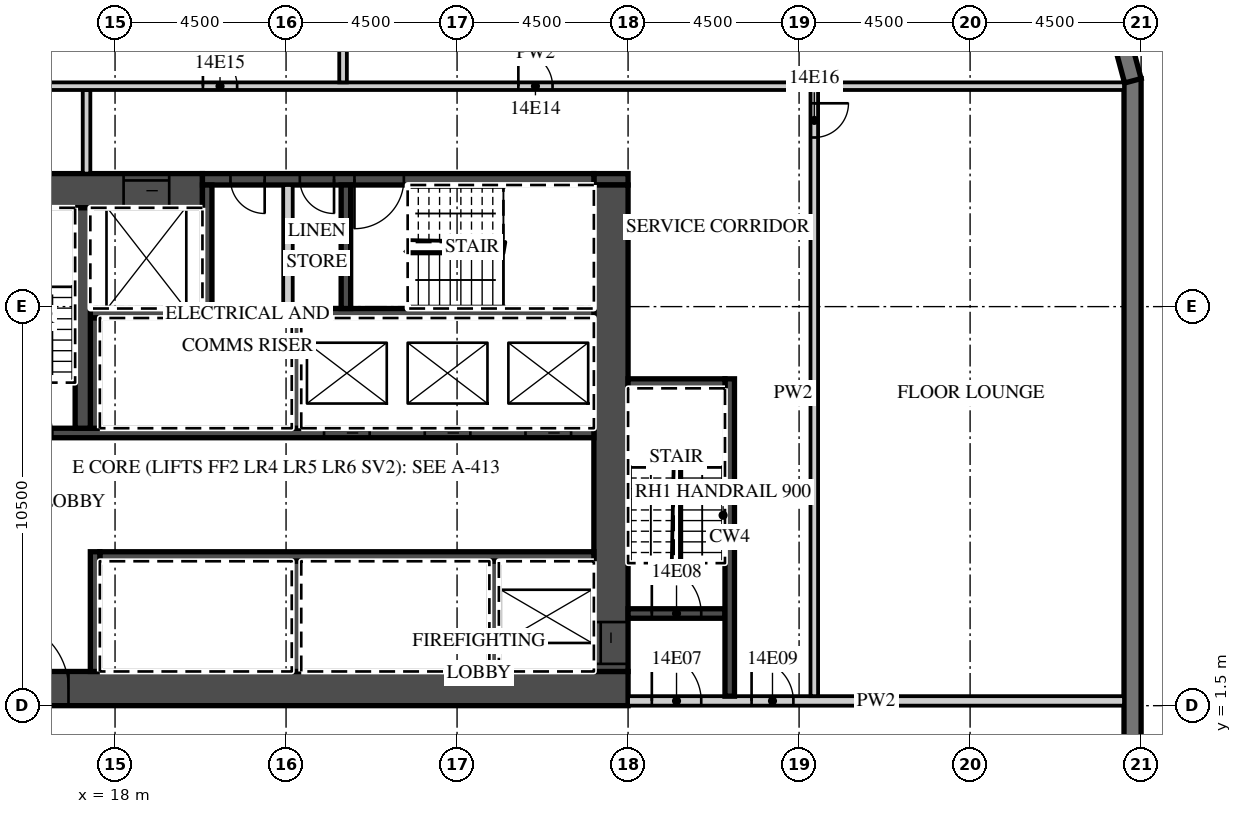
"""IFC4 building model, lengths in metres.
Left out: names, types, materials, properties, quantities, classifications, styles, units other than length and angle.
Written with IfcOpenShell. Run it as: python <this file> out.ifc"""

import sys

from ifc_helpers import new_model, si_unit, direction, frame, frame_2d, origin, place, context, subcontext, project, spatial, polyline, rectangle, outline, extrude, element, fill, save


model = new_model("IFC4")
c1 = context("Model", 3, precision=1e-05, world=origin(), true_north=direction((0.0, 1.0)))
c2 = subcontext(c1, "Body", "Model", "MODEL_VIEW")
j1 = project(units=[si_unit("LENGTHUNIT", "METRE"), si_unit("PLANEANGLEUNIT", "RADIAN")], contexts=[c1])
p1 = place(None, origin())
s1 = spatial("IfcSite", under=j1, at=p1, CompositionType="ELEMENT")
p2 = place(p1, origin())
s2 = spatial("IfcBuilding", under=s1, at=p2, CompositionType="ELEMENT")
p3 = place(p2, frame((0.0, 0.0, 76.5)))
s3 = spatial("IfcBuildingStorey", under=s2, at=p3, CompositionType="ELEMENT", Elevation=76.5)
p4 = place(p3, frame((44.775, -18.0, 0.0), z_axis=(0.0, 0.0, 1.0), x_axis=(0.0, 1.0, 0.0)))
e1 = element("IfcWall", 1, at=p4, inside=s3, PredefinedType="SOLIDWALL", context=c2, shape_type="SweptSolid", body=[
    extrude(rectangle(XDim=36.0, YDim=0.45, at=frame_2d((18.0, 0.0))), origin(), (0.0, 0.0, 1.0), 3.02),
])
p5 = place(p4, frame((3.9, 0.0, 0.45)))
e2 = element("IfcOpeningElement", 2, at=p5, cuts=e1, PredefinedType="OPENING", context=c2, shape_type="SweptSolid", body=[
    extrude(rectangle(XDim=3.3, YDim=2.25, at=frame_2d((1.65, 1.125))), frame((0.0, 0.235, 0.0), z_axis=(0.0, -1.0, 0.0), x_axis=(1.0, 0.0, 0.0)), (0.0, 0.0, 1.0), 0.47),
])
p6 = place(p4, frame((8.4, 0.0, 0.45)))
e3 = element("IfcOpeningElement", 3, at=p6, cuts=e1, PredefinedType="OPENING", context=c2, shape_type="SweptSolid", body=[
    extrude(rectangle(XDim=3.3, YDim=2.25, at=frame_2d((1.65, 1.125))), frame((0.0, 0.235, 0.0), z_axis=(0.0, -1.0, 0.0), x_axis=(1.0, 0.0, 0.0)), (0.0, 0.0, 1.0), 0.47),
])
p7 = place(p4, frame((12.9, 0.0, 0.45)))
e4 = element("IfcOpeningElement", 4, at=p7, cuts=e1, PredefinedType="OPENING", context=c2, shape_type="SweptSolid", body=[
    extrude(rectangle(XDim=3.3, YDim=2.25, at=frame_2d((1.65, 1.125))), frame((0.0, 0.235, 0.0), z_axis=(0.0, -1.0, 0.0), x_axis=(1.0, 0.0, 0.0)), (0.0, 0.0, 1.0), 0.47),
])
p8 = place(p3, frame((44.783, 17.942, 0.0), z_axis=(0.0, 0.0, 1.0), x_axis=(-0.25881466832, 0.965926999034, 0.0)))
e5 = element("IfcWall", 5, at=p8, inside=s3, PredefinedType="SOLIDWALL", context=c2, shape_type="SweptSolid", body=[
    extrude(outline(polyline([(0.0, -0.225), (2.071, -0.225), (1.95, 0.225), (0.121, 0.225), (0.0, -0.225)])), origin(), (0.0, 0.0, 1.0), 3.02),
])
p9 = place(p3, frame((13.5, 1.95, 0.0), z_axis=(0.0, 0.0, 1.0), x_axis=(1.0, 0.0, 0.0)))
e6 = element("IfcWall", 6, at=p9, inside=s3, PredefinedType="SHEAR", context=c2, shape_type="SweptSolid", body=[
    extrude(rectangle(XDim=18.0, YDim=0.9, at=frame_2d((9.0, 0.0))), origin(), (0.0, 0.0, 1.0), 3.02),
])
p10 = place(p9, frame((1.475, 0.0, 0.0)))
e7 = element("IfcOpeningElement", 7, at=p10, cuts=e6, PredefinedType="OPENING", context=c2, shape_type="SweptSolid", body=[
    extrude(rectangle(XDim=1.8, YDim=2.1, at=frame_2d((0.9, 1.05))), frame((0.0, 0.46, 0.0), z_axis=(0.0, -1.0, 0.0), x_axis=(1.0, 0.0, 0.0)), (0.0, 0.0, 1.0), 0.92),
])
p11 = place(p3, frame((13.5, 15.05, 0.0), z_axis=(0.0, 0.0, 1.0), x_axis=(1.0, 0.0, 0.0)))
e8 = element("IfcWall", 8, at=p11, inside=s3, PredefinedType="SHEAR", context=c2, shape_type="SweptSolid", body=[
    extrude(rectangle(XDim=6.8, YDim=0.9, at=frame_2d((3.4, 0.0))), origin(), (0.0, 0.0, 1.0), 3.02),
])
p12 = place(p11, frame((4.725, 0.0, 0.0)))
e9 = element("IfcOpeningElement", 9, at=p12, cuts=e8, PredefinedType="OPENING", context=c2, shape_type="SweptSolid", body=[
    extrude(rectangle(XDim=1.2, YDim=2.1, at=frame_2d((0.6, 1.05))), frame((0.0, 0.46, 0.0), z_axis=(0.0, -1.0, 0.0), x_axis=(1.0, 0.0, 0.0)), (0.0, 0.0, 1.0), 0.92),
])
p13 = place(p3, frame((30.6, 15.35, 0.0), z_axis=(0.0, 0.0, 1.0), x_axis=(1.0, 0.0, 0.0)))
e10 = element("IfcWall", 10, at=p13, inside=s3, PredefinedType="SHEAR", context=c2, shape_type="SweptSolid", body=[
    extrude(rectangle(XDim=0.9, YDim=0.3, at=frame_2d((0.45, 0.0))), origin(), (0.0, 0.0, 1.0), 3.02),
])
p14 = place(p3, frame((20.3, 15.35, 0.0), z_axis=(0.0, 0.0, 1.0), x_axis=(1.0, 0.0, 0.0)))
e11 = element("IfcWall", 11, at=p14, inside=s3, PredefinedType="SHEAR", context=c2, shape_type="SweptSolid", body=[
    extrude(rectangle(XDim=10.3, YDim=0.3, at=frame_2d((5.15, 0.0))), origin(), (0.0, 0.0, 1.0), 3.02),
])
p15 = place(p14, frame((4.0, 0.0, 0.0)))
e12 = element("IfcOpeningElement", 12, at=p15, cuts=e11, PredefinedType="OPENING", context=c2, shape_type="SweptSolid", body=[
    extrude(rectangle(XDim=1.3, YDim=2.1, at=frame_2d((0.65, 1.05))), frame((0.0, 0.16, 0.0), z_axis=(0.0, -1.0, 0.0), x_axis=(1.0, 0.0, 0.0)), (0.0, 0.0, 1.0), 0.32),
])
p16 = place(p14, frame((2.562, 0.0, 0.0)))
e13 = element("IfcOpeningElement", 13, at=p16, cuts=e11, PredefinedType="OPENING", context=c2, shape_type="SweptSolid", body=[
    extrude(rectangle(XDim=0.9, YDim=2.1, at=frame_2d((0.45, 1.05))), frame((0.0, 0.16, 0.0), z_axis=(0.0, -1.0, 0.0), x_axis=(1.0, 0.0, 0.0)), (0.0, 0.0, 1.0), 0.32),
])
p17 = place(p14, frame((0.738, 0.0, 0.0)))
e14 = element("IfcOpeningElement", 14, at=p17, cuts=e11, PredefinedType="OPENING", context=c2, shape_type="SweptSolid", body=[
    extrude(rectangle(XDim=0.9, YDim=2.1, at=frame_2d((0.45, 1.05))), frame((0.0, 0.16, 0.0), z_axis=(0.0, -1.0, 0.0), x_axis=(1.0, 0.0, 0.0)), (0.0, 0.0, 1.0), 0.32),
])
p18 = place(p3, frame((31.05, 2.4, 0.0), z_axis=(0.0, 0.0, 1.0), x_axis=(0.0, 1.0, 0.0)))
e15 = element("IfcWall", 15, at=p18, inside=s3, PredefinedType="SHEAR", context=c2, shape_type="SweptSolid", body=[
    extrude(rectangle(XDim=12.8, YDim=0.9, at=frame_2d((6.4, 0.0))), origin(), (0.0, 0.0, 1.0), 3.02),
])
p19 = place(p18, frame((0.2, 0.0, 0.0)))
e16 = element("IfcOpeningElement", 16, at=p19, cuts=e15, PredefinedType="OPENING", context=c2, shape_type="SweptSolid", body=[
    extrude(rectangle(XDim=1.1, YDim=2.1, at=frame_2d((0.55, 1.05))), frame((0.0, 0.46, 0.0), z_axis=(0.0, -1.0, 0.0), x_axis=(1.0, 0.0, 0.0)), (0.0, 0.0, 1.0), 0.92),
])
p20 = place(p3, frame((17.6, 5.425, 0.0), z_axis=(0.0, 0.0, 1.0), x_axis=(1.0, 0.0, 0.0)))
e17 = element("IfcWall", 17, at=p20, inside=s3, PredefinedType="SHEAR", context=c2, shape_type="SweptSolid", body=[
    extrude(rectangle(XDim=13.0, YDim=0.25, at=frame_2d((6.5, 0.0))), origin(), (0.0, 0.0, 1.0), 3.02),
])
p21 = place(p3, frame((17.475, 2.4, 0.0), z_axis=(0.0, 0.0, 1.0), x_axis=(0.0, 1.0, 0.0)))
e18 = element("IfcWall", 18, at=p21, inside=s3, PredefinedType="SHEAR", context=c2, shape_type="SweptSolid", body=[
    extrude(rectangle(XDim=3.15, YDim=0.25, at=frame_2d((1.575, 0.0))), origin(), (0.0, 0.0, 1.0), 3.02),
])
for number, where, z_axis, x_axis in (
    (19, (27.975, 2.4, 0.0), (0.0, 0.0, 1.0), (0.0, 1.0, 0.0)),
    (20, (22.775, 2.4, 0.0), (0.0, 0.0, 1.0), (0.0, 1.0, 0.0)),
):
    element("IfcWall", number, at=place(p3, frame(where, z_axis=z_axis, x_axis=x_axis)), inside=s3, PredefinedType="SHEAR", context=c2, shape_type="SweptSolid", body=[
        extrude(rectangle(XDim=2.9, YDim=0.25, at=frame_2d((1.45, 0.0))), origin(), (0.0, 0.0, 1.0), 3.02),
    ])
p22 = place(p3, frame((14.4, 8.675, 0.0), z_axis=(0.0, 0.0, 1.0), x_axis=(1.0, 0.0, 0.0)))
e21 = element("IfcWall", 21, at=p22, inside=s3, PredefinedType="SHEAR", context=c2, shape_type="SweptSolid", body=[
    extrude(rectangle(XDim=16.2, YDim=0.25, at=frame_2d((8.1, 0.0))), origin(), (0.0, 0.0, 1.0), 3.02),
])
p23 = place(p22, frame((14.4, 0.0, 0.0)))
e22 = element("IfcOpeningElement", 22, at=p23, cuts=e21, PredefinedType="OPENING", context=c2, shape_type="SweptSolid", body=[
    extrude(rectangle(XDim=1.2, YDim=2.1, at=frame_2d((0.6, 1.05))), frame((0.0, 0.135, 0.0), z_axis=(0.0, -1.0, 0.0), x_axis=(1.0, 0.0, 0.0)), (0.0, 0.0, 1.0), 0.27),
])
p24 = place(p22, frame((11.75, 0.0, 0.0)))
e23 = element("IfcOpeningElement", 23, at=p24, cuts=e21, PredefinedType="OPENING", context=c2, shape_type="SweptSolid", body=[
    extrude(rectangle(XDim=1.2, YDim=2.1, at=frame_2d((0.6, 1.05))), frame((0.0, 0.135, 0.0), z_axis=(0.0, -1.0, 0.0), x_axis=(1.0, 0.0, 0.0)), (0.0, 0.0, 1.0), 0.27),
])
p25 = place(p22, frame((9.1, 0.0, 0.0)))
e24 = element("IfcOpeningElement", 24, at=p25, cuts=e21, PredefinedType="OPENING", context=c2, shape_type="SweptSolid", body=[
    extrude(rectangle(XDim=1.2, YDim=2.1, at=frame_2d((0.6, 1.05))), frame((0.0, 0.135, 0.0), z_axis=(0.0, -1.0, 0.0), x_axis=(1.0, 0.0, 0.0)), (0.0, 0.0, 1.0), 0.27),
])
p26 = place(p22, frame((0.65, 0.0, 0.0)))
e25 = element("IfcOpeningElement", 25, at=p26, cuts=e21, PredefinedType="OPENING", context=c2, shape_type="SweptSolid", body=[
    extrude(rectangle(XDim=1.3, YDim=2.1, at=frame_2d((0.65, 1.05))), frame((0.0, 0.135, 0.0), z_axis=(0.0, -1.0, 0.0), x_axis=(1.0, 0.0, 0.0)), (0.0, 0.0, 1.0), 0.27),
])
p27 = place(p3, frame((17.35, 11.825, 0.0), z_axis=(0.0, 0.0, 1.0), x_axis=(1.0, 0.0, 0.0)))
e26 = element("IfcWall", 26, at=p27, inside=s3, PredefinedType="SHEAR", context=c2, shape_type="SweptSolid", body=[
    extrude(rectangle(XDim=13.25, YDim=0.25, at=frame_2d((6.625, 0.0))), origin(), (0.0, 0.0, 1.0), 3.02),
])
for number, where, z_axis, x_axis in (
    (27, (17.475, 8.8, 0.0), (0.0, 0.0, 1.0), (0.0, 1.0, 0.0)),
    (28, (22.775, 8.8, 0.0), (0.0, 0.0, 1.0), (0.0, 1.0, 0.0)),
):
    element("IfcWall", number, at=place(p3, frame(where, z_axis=z_axis, x_axis=x_axis)), inside=s3, PredefinedType="SHEAR", context=c2, shape_type="SweptSolid", body=[
        extrude(rectangle(XDim=2.9, YDim=0.25, at=frame_2d((1.45, 0.0))), origin(), (0.0, 0.0, 1.0), 3.02),
    ])
p28 = place(p3, frame((17.15, 8.8, 0.0), z_axis=(0.0, 0.0, 1.0), x_axis=(0.0, 1.0, 0.0)))
e29 = element("IfcWall", 29, at=p28, inside=s3, PredefinedType="SHEAR", context=c2, shape_type="SweptSolid", body=[
    extrude(rectangle(XDim=5.8, YDim=0.4, at=frame_2d((2.9, 0.0))), origin(), (0.0, 0.0, 1.0), 3.02),
])
for number, where, z_axis, x_axis in (
    (30, (20.425, 11.95, 0.0), (0.0, 0.0, 1.0), (0.0, 1.0, 0.0)),
    (31, (24.075, 11.95, 0.0), (0.0, 0.0, 1.0), (0.0, 1.0, 0.0)),
):
    element("IfcWall", number, at=place(p3, frame(where, z_axis=z_axis, x_axis=x_axis)), inside=s3, PredefinedType="SHEAR", context=c2, shape_type="SweptSolid", body=[
        extrude(rectangle(XDim=3.25, YDim=0.25, at=frame_2d((1.625, 0.0))), origin(), (0.0, 0.0, 1.0), 3.02),
    ])
p29 = place(p3, frame((22.55, 11.95, 0.0), z_axis=(0.0, 0.0, 1.0), x_axis=(0.0, 1.0, 0.0)))
e32 = element("IfcWall", 32, at=p29, inside=s3, PredefinedType="PARTITIONING", context=c2, shape_type="SweptSolid", body=[
    extrude(rectangle(XDim=3.25, YDim=0.25, at=frame_2d((1.625, 0.0))), origin(), (0.0, 0.0, 1.0), 3.02),
])
p30 = place(p3, frame((31.5, 1.625, 0.0), z_axis=(0.0, 0.0, 1.0), x_axis=(1.0, 0.0, 0.0)))
e33 = element("IfcWall", 33, at=p30, inside=s3, PredefinedType="PARTITIONING", context=c2, shape_type="SweptSolid", body=[
    extrude(rectangle(XDim=13.05, YDim=0.25, at=frame_2d((6.525, 0.0))), origin(), (0.0, 0.0, 1.0), 3.02),
])
p31 = place(p30, frame((0.625, 0.0, 0.0)))
e34 = element("IfcOpeningElement", 34, at=p31, cuts=e33, PredefinedType="OPENING", context=c2, shape_type="SweptSolid", body=[
    extrude(rectangle(XDim=1.3, YDim=2.1, at=frame_2d((0.65, 1.05))), frame((0.0, 0.135, 0.0), z_axis=(0.0, -1.0, 0.0), x_axis=(1.0, 0.0, 0.0)), (0.0, 0.0, 1.0), 0.27),
])
p32 = place(p30, frame((3.25, 0.0, 0.0)))
e35 = element("IfcOpeningElement", 35, at=p32, cuts=e33, PredefinedType="OPENING", context=c2, shape_type="SweptSolid", body=[
    extrude(rectangle(XDim=1.1, YDim=2.1, at=frame_2d((0.55, 1.05))), frame((0.0, 0.135, 0.0), z_axis=(0.0, -1.0, 0.0), x_axis=(1.0, 0.0, 0.0)), (0.0, 0.0, 1.0), 0.27),
])
p33 = place(p3, frame((31.5, 3.925, 0.0), z_axis=(0.0, 0.0, 1.0), x_axis=(1.0, 0.0, 0.0)))
e36 = element("IfcWall", 36, at=p33, inside=s3, PredefinedType="SHEAR", context=c2, shape_type="SweptSolid", body=[
    extrude(rectangle(XDim=2.55, YDim=0.25, at=frame_2d((1.275, 0.0))), origin(), (0.0, 0.0, 1.0), 3.02),
])
p34 = place(p33, frame((0.625, 0.0, 0.0)))
e37 = element("IfcOpeningElement", 37, at=p34, cuts=e36, PredefinedType="OPENING", context=c2, shape_type="SweptSolid", body=[
    extrude(rectangle(XDim=1.3, YDim=2.1, at=frame_2d((0.65, 1.05))), frame((0.0, 0.135, 0.0), z_axis=(0.0, -1.0, 0.0), x_axis=(1.0, 0.0, 0.0)), (0.0, 0.0, 1.0), 0.27),
])
p35 = place(p3, frame((34.175, 1.75, 0.0), z_axis=(0.0, 0.0, 1.0), x_axis=(0.0, 1.0, 0.0)))
e38 = element("IfcWall", 38, at=p35, inside=s3, PredefinedType="SHEAR", context=c2, shape_type="SweptSolid", body=[
    extrude(rectangle(XDim=8.35, YDim=0.25, at=frame_2d((4.175, 0.0))), origin(), (0.0, 0.0, 1.0), 3.02),
])
p36 = place(p3, frame((31.5, 9.975, 0.0), z_axis=(0.0, 0.0, 1.0), x_axis=(1.0, 0.0, 0.0)))
e39 = element("IfcWall", 39, at=p36, inside=s3, PredefinedType="SHEAR", context=c2, shape_type="SweptSolid", body=[
    extrude(rectangle(XDim=2.55, YDim=0.25, at=frame_2d((1.275, 0.0))), origin(), (0.0, 0.0, 1.0), 3.02),
])
p37 = place(p3, frame((17.25, 15.5, 0.0), z_axis=(0.0, 0.0, 1.0), x_axis=(0.0, 1.0, 0.0)))
e40 = element("IfcWall", 40, at=p37, inside=s3, PredefinedType="PARTITIONING", context=c2, shape_type="SweptSolid", body=[
    extrude(rectangle(XDim=2.2, YDim=0.2, at=frame_2d((1.1, 0.0))), origin(), (0.0, 0.0, 1.0), 3.02),
])
p38 = place(p3, frame((36.4, 1.75, 0.0), z_axis=(0.0, 0.0, 1.0), x_axis=(0.0, 1.0, 0.0)))
e41 = element("IfcWall", 41, at=p38, inside=s3, PredefinedType="PARTITIONING", context=c2, shape_type="SweptSolid", body=[
    extrude(rectangle(XDim=15.95, YDim=0.2, at=frame_2d((7.975, 0.0))), origin(), (0.0, 0.0, 1.0), 3.02),
])
p39 = place(p38, frame((14.7, 0.0, 0.0)))
e42 = element("IfcOpeningElement", 42, at=p39, cuts=e41, PredefinedType="OPENING", context=c2, shape_type="SweptSolid", body=[
    extrude(rectangle(XDim=0.9, YDim=2.1, at=frame_2d((0.45, 1.05))), frame((0.0, 0.11, 0.0), z_axis=(0.0, -1.0, 0.0), x_axis=(1.0, 0.0, 0.0)), (0.0, 0.0, 1.0), 0.22),
])
p40 = place(p3, frame((13.6, 17.8, 0.0), z_axis=(0.0, 0.0, 1.0), x_axis=(1.0, 0.0, 0.0)))
e43 = element("IfcWall", 43, at=p40, inside=s3, PredefinedType="PARTITIONING", context=c2, shape_type="SweptSolid", body=[
    extrude(rectangle(XDim=30.95, YDim=0.2, at=frame_2d((15.475, 0.0))), origin(), (0.0, 0.0, 1.0), 3.02),
])
p41 = place(p40, frame((15.012, 0.0, 0.0)))
e44 = element("IfcOpeningElement", 44, at=p41, cuts=e43, PredefinedType="OPENING", context=c2, shape_type="SweptSolid", body=[
    extrude(rectangle(XDim=0.9, YDim=2.1, at=frame_2d((0.45, 1.05))), frame((0.0, 0.11, 0.0), z_axis=(0.0, -1.0, 0.0), x_axis=(1.0, 0.0, 0.0)), (0.0, 0.0, 1.0), 0.22),
])
p42 = place(p40, frame((6.712, 0.0, 0.0)))
e45 = element("IfcOpeningElement", 45, at=p42, cuts=e43, PredefinedType="OPENING", context=c2, shape_type="SweptSolid", body=[
    extrude(rectangle(XDim=0.9, YDim=2.1, at=frame_2d((0.45, 1.05))), frame((0.0, 0.11, 0.0), z_axis=(0.0, -1.0, 0.0), x_axis=(1.0, 0.0, 0.0)), (0.0, 0.0, 1.0), 0.22),
])
p43 = place(p3, frame((24.0, 17.9, 0.0), z_axis=(0.0, 0.0, 1.0), x_axis=(0.0, 1.0, 0.0)))
e46 = element("IfcWall", 46, at=p43, inside=s3, PredefinedType="PARTITIONING", context=c2, shape_type="SweptSolid", body=[
    extrude(rectangle(XDim=3.65, YDim=0.2, at=frame_2d((1.825, 0.0))), origin(), (0.0, 0.0, 1.0), 3.02),
])
p44 = place(p23, origin())
e47 = element("IfcDoor", 47, at=p44, inside=s3, OperationType="SLIDING_TO_LEFT", PredefinedType="DOOR", context=c2, shape_type="SweptSolid", body=[
    extrude(rectangle(XDim=1.2, YDim=2.1, at=frame_2d((0.6, 1.05))), frame((0.0, 0.025, 0.0), z_axis=(0.0, -1.0, 0.0), x_axis=(1.0, 0.0, 0.0)), (0.0, 0.0, 1.0), 0.05),
])
fill(e22, e47)
p45 = place(p24, origin())
e48 = element("IfcDoor", 48, at=p45, inside=s3, OperationType="SLIDING_TO_RIGHT", PredefinedType="DOOR", context=c2, shape_type="SweptSolid", body=[
    extrude(rectangle(XDim=1.2, YDim=2.1, at=frame_2d((0.6, 1.05))), frame((0.0, 0.025, 0.0), z_axis=(0.0, -1.0, 0.0), x_axis=(1.0, 0.0, 0.0)), (0.0, 0.0, 1.0), 0.05),
])
fill(e23, e48)
p46 = place(p25, origin())
e49 = element("IfcDoor", 49, at=p46, inside=s3, OperationType="SLIDING_TO_RIGHT", PredefinedType="DOOR", context=c2, shape_type="SweptSolid", body=[
    extrude(rectangle(XDim=1.2, YDim=2.1, at=frame_2d((0.6, 1.05))), frame((0.0, 0.025, 0.0), z_axis=(0.0, -1.0, 0.0), x_axis=(1.0, 0.0, 0.0)), (0.0, 0.0, 1.0), 0.05),
])
fill(e24, e49)
p47 = place(p12, origin())
e50 = element("IfcDoor", 50, at=p47, inside=s3, OperationType="SLIDING_TO_LEFT", PredefinedType="DOOR", context=c2, shape_type="SweptSolid", body=[
    extrude(rectangle(XDim=1.2, YDim=2.1, at=frame_2d((0.6, 1.05))), frame((0.0, 0.025, 0.0), z_axis=(0.0, -1.0, 0.0), x_axis=(1.0, 0.0, 0.0)), (0.0, 0.0, 1.0), 0.05),
])
fill(e9, e50)
p48 = place(p19, origin())
e51 = element("IfcDoor", 51, at=p48, inside=s3, OperationType="SLIDING_TO_LEFT", PredefinedType="DOOR", context=c2, shape_type="SweptSolid", body=[
    extrude(rectangle(XDim=1.1, YDim=2.1, at=frame_2d((0.55, 1.05))), frame((0.0, 0.025, 0.0), z_axis=(0.0, -1.0, 0.0), x_axis=(1.0, 0.0, 0.0)), (0.0, 0.0, 1.0), 0.05),
])
fill(e16, e51)
p49 = place(p10, origin())
e52 = element("IfcDoor", 52, at=p49, inside=s3, OperationType="DOUBLE_DOOR_DOUBLE_SWING", PredefinedType="DOOR", context=c2, shape_type="SweptSolid", body=[
    extrude(rectangle(XDim=1.8, YDim=2.1, at=frame_2d((0.9, 1.05))), frame((0.0, 0.025, 0.0), z_axis=(0.0, -1.0, 0.0), x_axis=(1.0, 0.0, 0.0)), (0.0, 0.0, 1.0), 0.05),
])
fill(e7, e52)
p50 = place(p31, origin())
e53 = element("IfcDoor", 53, at=p50, inside=s3, OperationType="SINGLE_SWING_LEFT", PredefinedType="DOOR", context=c2, shape_type="SweptSolid", body=[
    extrude(rectangle(XDim=1.3, YDim=2.1, at=frame_2d((0.65, 1.05))), frame((0.0, 0.025, 0.0), z_axis=(0.0, -1.0, 0.0), x_axis=(1.0, 0.0, 0.0)), (0.0, 0.0, 1.0), 0.05),
])
fill(e34, e53)
p51 = place(p34, origin())
e54 = element("IfcDoor", 54, at=p51, inside=s3, OperationType="SINGLE_SWING_LEFT", PredefinedType="DOOR", context=c2, shape_type="SweptSolid", body=[
    extrude(rectangle(XDim=1.3, YDim=2.1, at=frame_2d((0.65, 1.05))), frame((0.0, 0.025, 0.0), z_axis=(0.0, -1.0, 0.0), x_axis=(1.0, 0.0, 0.0)), (0.0, 0.0, 1.0), 0.05),
])
fill(e37, e54)
p52 = place(p32, origin())
e55 = element("IfcDoor", 55, at=p52, inside=s3, OperationType="SINGLE_SWING_LEFT", PredefinedType="DOOR", context=c2, shape_type="SweptSolid", body=[
    extrude(rectangle(XDim=1.1, YDim=2.1, at=frame_2d((0.55, 1.05))), frame((0.0, 0.025, 0.0), z_axis=(0.0, -1.0, 0.0), x_axis=(1.0, 0.0, 0.0)), (0.0, 0.0, 1.0), 0.05),
])
fill(e35, e55)
p53 = place(p15, origin())
e56 = element("IfcDoor", 56, at=p53, inside=s3, OperationType="SINGLE_SWING_LEFT", PredefinedType="DOOR", context=c2, shape_type="SweptSolid", body=[
    extrude(rectangle(XDim=1.3, YDim=2.1, at=frame_2d((0.65, 1.05))), frame((0.0, 0.025, 0.0), z_axis=(0.0, -1.0, 0.0), x_axis=(1.0, 0.0, 0.0)), (0.0, 0.0, 1.0), 0.05),
])
fill(e12, e56)
p54 = place(p16, origin())
e57 = element("IfcDoor", 57, at=p54, inside=s3, OperationType="SINGLE_SWING_RIGHT", PredefinedType="DOOR", context=c2, shape_type="SweptSolid", body=[
    extrude(rectangle(XDim=0.9, YDim=2.1, at=frame_2d((0.45, 1.05))), frame((0.0, 0.025, 0.0), z_axis=(0.0, -1.0, 0.0), x_axis=(1.0, 0.0, 0.0)), (0.0, 0.0, 1.0), 0.05),
])
fill(e13, e57)
p55 = place(p17, origin())
e58 = element("IfcDoor", 58, at=p55, inside=s3, OperationType="SINGLE_SWING_RIGHT", PredefinedType="DOOR", context=c2, shape_type="SweptSolid", body=[
    extrude(rectangle(XDim=0.9, YDim=2.1, at=frame_2d((0.45, 1.05))), frame((0.0, 0.025, 0.0), z_axis=(0.0, -1.0, 0.0), x_axis=(1.0, 0.0, 0.0)), (0.0, 0.0, 1.0), 0.05),
])
fill(e14, e58)
p56 = place(p41, origin())
e59 = element("IfcDoor", 59, at=p56, inside=s3, OperationType="SINGLE_SWING_LEFT", PredefinedType="DOOR", context=c2, shape_type="SweptSolid", body=[
    extrude(rectangle(XDim=0.9, YDim=2.1, at=frame_2d((0.45, 1.05))), frame((0.0, 0.025, 0.0), z_axis=(0.0, -1.0, 0.0), x_axis=(1.0, 0.0, 0.0)), (0.0, 0.0, 1.0), 0.05),
])
fill(e44, e59)
p57 = place(p42, origin())
e60 = element("IfcDoor", 60, at=p57, inside=s3, OperationType="SINGLE_SWING_LEFT", PredefinedType="DOOR", context=c2, shape_type="SweptSolid", body=[
    extrude(rectangle(XDim=0.9, YDim=2.1, at=frame_2d((0.45, 1.05))), frame((0.0, 0.025, 0.0), z_axis=(0.0, -1.0, 0.0), x_axis=(1.0, 0.0, 0.0)), (0.0, 0.0, 1.0), 0.05),
])
fill(e45, e60)
p58 = place(p39, origin())
e61 = element("IfcDoor", 61, at=p58, inside=s3, OperationType="SINGLE_SWING_RIGHT", PredefinedType="DOOR", context=c2, shape_type="SweptSolid", body=[
    extrude(rectangle(XDim=0.9, YDim=2.1, at=frame_2d((0.45, 1.05))), frame((0.0, 0.025, 0.0), z_axis=(0.0, -1.0, 0.0), x_axis=(1.0, 0.0, 0.0)), (0.0, 0.0, 1.0), 0.05),
])
fill(e42, e61)
save(model, sys.argv[1])
